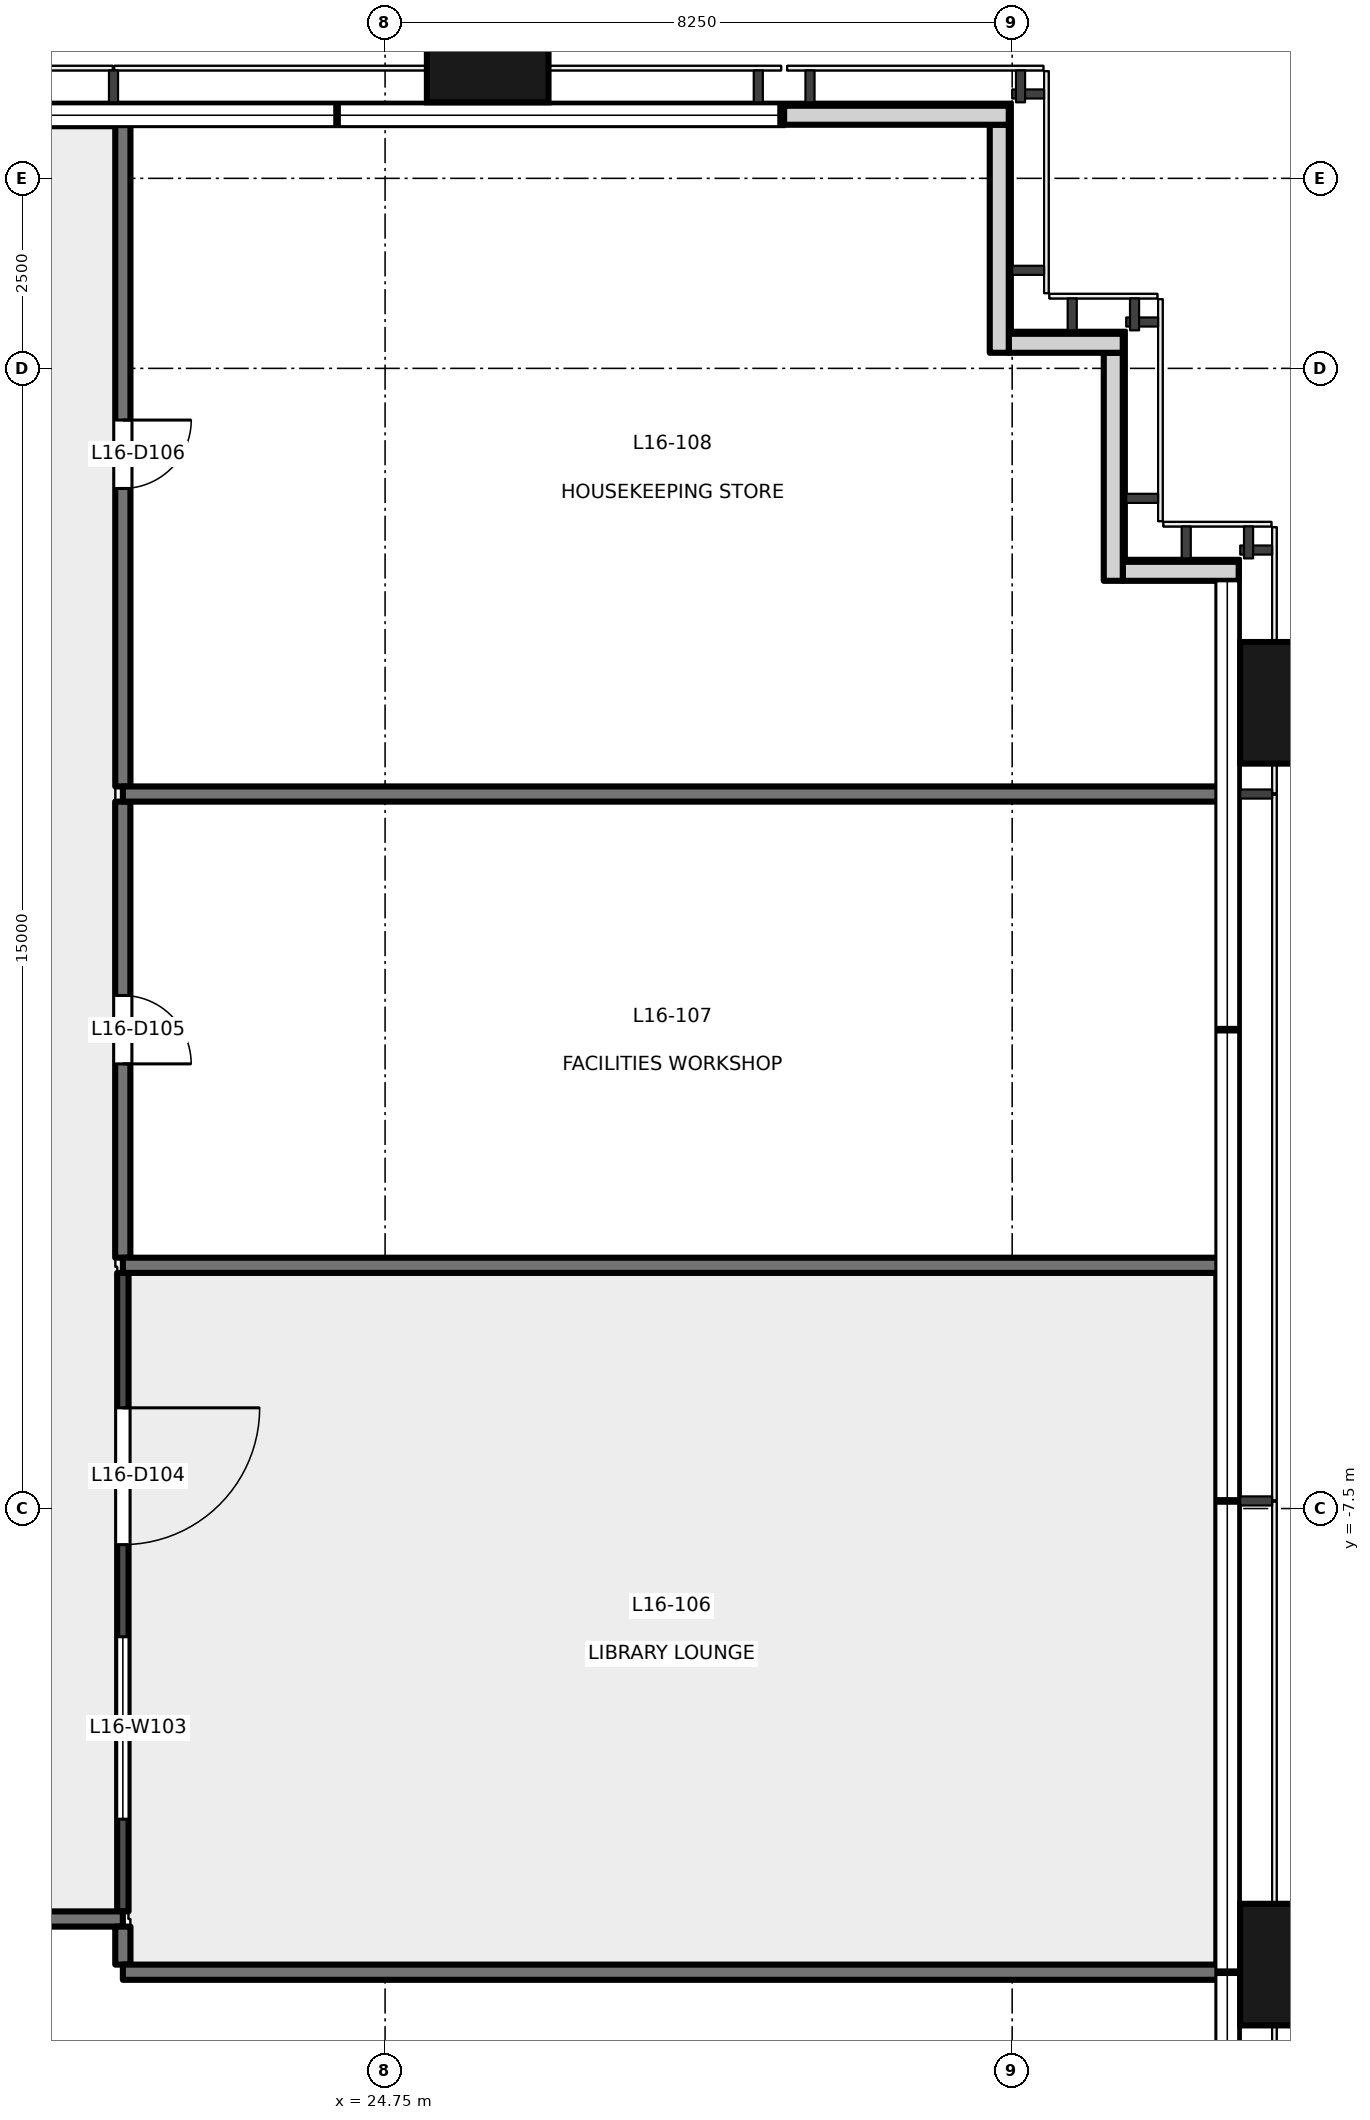
"""IFC4 building model, lengths in metres.
Left out: names, types, materials, properties, quantities, classifications, styles, units other than length and angle.
Written with IfcOpenShell. Run it as: python <this file> out.ifc"""

import sys

from ifc_helpers import new_model, si_unit, direction, frame, frame_2d, origin, origin_2d, place, context, subcontext, project, spatial, rectangle, extrude, element, fill, save


model = new_model("IFC4")
c1 = context("Model", 3, precision=1e-05, world=origin(), true_north=direction((0.0, 1.0)))
c2 = subcontext(c1, "Body", "Model", "MODEL_VIEW")
j1 = project(units=[si_unit("LENGTHUNIT", "METRE"), si_unit("PLANEANGLEUNIT", "RADIAN")], contexts=[c1])
p1 = place(None, origin())
s1 = spatial("IfcSite", under=j1, at=p1, CompositionType="ELEMENT")
p2 = place(p1, origin())
s2 = spatial("IfcBuilding", under=s1, at=p2, CompositionType="ELEMENT")
p3 = place(p2, frame((0.0, 0.0, 74.3)))
s3 = spatial("IfcBuildingStorey", under=s2, at=p3, CompositionType="ELEMENT", Elevation=74.3)
for number, where, z_axis, x_axis in (
    (1, (36.9, -13.5, -0.2), (0.0, 0.0, 1.0), (0.0, 1.0, 0.0)),
    (2, (36.9, 3.1, -0.2), (0.0, 0.0, 1.0), (0.0, 1.0, 0.0)),
    (3, (26.1, 11.9, -0.2), (0.0, 0.0, 1.0), (1.0, 0.0, 0.0)),
):
    element("IfcColumn", number, at=place(p3, frame(where, z_axis=z_axis, x_axis=x_axis)), inside=s3, PredefinedType="COLUMN", context=c2, shape_type="SweptSolid", body=[
        extrude(rectangle(XDim=1.6, YDim=1.8, at=origin_2d()), origin(), (0.0, 0.0, 1.0), 5.4),
    ])
p4 = place(p3, frame((35.98, 4.83, 0.0), z_axis=(0.0, 0.0, 1.0), x_axis=(-1.0, 0.0, 0.0)))
e4 = element("IfcWall", 4, at=p4, inside=s3, PredefinedType="SOLIDWALL", context=c2, shape_type="SweptSolid", body=[
    extrude(rectangle(XDim=1.525, YDim=0.25, at=frame_2d((0.762, 0.0))), origin(), (0.0, 0.0, 1.0), 5.2),
])
p5 = place(p3, frame((34.33, 4.705, 0.0), z_axis=(0.0, 0.0, 1.0), x_axis=(0.0, 1.0, 0.0)))
e5 = element("IfcWall", 5, at=p5, inside=s3, PredefinedType="SOLIDWALL", context=c2, shape_type="SweptSolid", body=[
    extrude(rectangle(XDim=3.0, YDim=0.25, at=frame_2d((1.5, 0.0))), origin(), (0.0, 0.0, 1.0), 5.2),
])
p6 = place(p3, frame((34.455, 7.83, 0.0), z_axis=(0.0, 0.0, 1.0), x_axis=(-1.0, 0.0, 0.0)))
e6 = element("IfcWall", 6, at=p6, inside=s3, PredefinedType="SOLIDWALL", context=c2, shape_type="SweptSolid", body=[
    extrude(rectangle(XDim=1.5, YDim=0.25, at=frame_2d((0.75, 0.0))), origin(), (0.0, 0.0, 1.0), 5.2),
])
p7 = place(p3, frame((32.83, 7.705, 0.0), z_axis=(0.0, 0.0, 1.0), x_axis=(0.0, 1.0, 0.0)))
e7 = element("IfcWall", 7, at=p7, inside=s3, PredefinedType="SOLIDWALL", context=c2, shape_type="SweptSolid", body=[
    extrude(rectangle(XDim=3.0, YDim=0.25, at=frame_2d((1.5, 0.0))), origin(), (0.0, 0.0, 1.0), 5.2),
])
p8 = place(p3, frame((32.955, 10.83, 0.0), z_axis=(0.0, 0.0, 1.0), x_axis=(-1.0, 0.0, 0.0)))
e8 = element("IfcWall", 8, at=p8, inside=s3, PredefinedType="SOLIDWALL", context=c2, shape_type="SweptSolid", body=[
    extrude(rectangle(XDim=2.955, YDim=0.25, at=frame_2d((1.478, 0.0))), origin(), (0.0, 0.0, 1.0), 5.2),
])
p9 = place(p3, frame((21.3, -12.9, 0.0), z_axis=(0.0, 0.0, 1.0), x_axis=(-1.0, 0.0, 0.0)))
e9 = element("IfcWall", 9, at=p9, inside=s3, PredefinedType="PARTITIONING", context=c2, shape_type="SweptSolid", body=[
    extrude(rectangle(XDim=11.788, YDim=0.2, at=frame_2d((5.894, 0.0))), origin(), (0.0, 0.0, 1.0), 3.8),
])
p10 = place(p9, frame((5.444, 0.0, 0.0)))
e10 = element("IfcOpeningElement", 10, at=p10, cuts=e9, PredefinedType="OPENING", context=c2, shape_type="SweptSolid", body=[
    extrude(rectangle(XDim=0.9, YDim=2.1, at=frame_2d((0.45, 1.05))), frame((0.0, 0.111, 0.0), z_axis=(0.0, -1.0, 0.0), x_axis=(1.0, 0.0, 0.0)), (0.0, 0.0, 1.0), 0.221),
])
p11 = place(p3, frame((21.3, -4.4, 0.0), z_axis=(0.0, 0.0, 1.0), x_axis=(0.0, -1.0, 0.0)))
e11 = element("IfcWall", 11, at=p11, inside=s3, PredefinedType="PARTITIONING", context=c2, shape_type="SweptSolid", body=[
    extrude(rectangle(XDim=8.4, YDim=0.15, at=frame_2d((4.2, 0.0))), origin(), (0.0, 0.0, 1.0), 4.3),
])
p12 = place(p11, frame((1.775, 0.0, 0.0)))
e12 = element("IfcOpeningElement", 12, at=p12, cuts=e11, PredefinedType="OPENING", context=c2, shape_type="SweptSolid", body=[
    extrude(rectangle(XDim=1.8, YDim=2.1, at=frame_2d((0.9, 1.05))), frame((0.0, 0.085, 0.0), z_axis=(0.0, -1.0, 0.0), x_axis=(1.0, 0.0, 0.0)), (0.0, 0.0, 1.0), 0.171),
])
p13 = place(p11, frame((4.787, 0.0, 0.0)))
e13 = element("IfcOpeningElement", 13, at=p13, cuts=e11, PredefinedType="OPENING", context=c2, shape_type="SweptSolid", body=[
    extrude(rectangle(XDim=2.4, YDim=2.4, at=frame_2d((1.2, 1.2))), frame((0.0, 0.085, 0.0), z_axis=(0.0, -1.0, 0.0), x_axis=(1.0, 0.0, 0.0)), (0.0, 0.0, 1.0), 0.171),
])
p14 = place(p3, frame((21.299, 1.8, 0.0), z_axis=(0.0, 0.0, 1.0), x_axis=(0.0, -1.0, 0.0)))
e14 = element("IfcWall", 14, at=p14, inside=s3, PredefinedType="PARTITIONING", context=c2, shape_type="SweptSolid", body=[
    extrude(rectangle(XDim=6.0, YDim=0.2, at=frame_2d((3.0, 0.0))), origin(), (0.0, 0.0, 1.0), 4.3),
])
p15 = place(p14, frame((2.55, 0.0, 0.0)))
e15 = element("IfcOpeningElement", 15, at=p15, cuts=e14, PredefinedType="OPENING", context=c2, shape_type="SweptSolid", body=[
    extrude(rectangle(XDim=0.9, YDim=2.1, at=frame_2d((0.45, 1.05))), frame((0.0, 0.111, 0.0), z_axis=(0.0, -1.0, 0.0), x_axis=(1.0, 0.0, 0.0)), (0.0, 0.0, 1.0), 0.221),
])
p16 = place(p3, frame((21.3, 10.74, 0.0), z_axis=(0.0, 0.0, 1.0), x_axis=(0.0, -1.0, 0.0)))
e16 = element("IfcWall", 16, at=p16, inside=s3, PredefinedType="PARTITIONING", context=c2, shape_type="SweptSolid", body=[
    extrude(rectangle(XDim=8.74, YDim=0.2, at=frame_2d((4.37, 0.0))), origin(), (0.0, 0.0, 1.0), 4.3),
])
p17 = place(p16, frame((3.92, 0.0, 0.0)))
e17 = element("IfcOpeningElement", 17, at=p17, cuts=e16, PredefinedType="OPENING", context=c2, shape_type="SweptSolid", body=[
    extrude(rectangle(XDim=0.9, YDim=2.1, at=frame_2d((0.45, 1.05))), frame((0.0, 0.111, 0.0), z_axis=(0.0, -1.0, 0.0), x_axis=(1.0, 0.0, 0.0)), (0.0, 0.0, 1.0), 0.221),
])
p18 = place(p3, frame((21.3, -13.0, 0.0), z_axis=(0.0, 0.0, 1.0), x_axis=(0.0, -1.0, 0.0)))
e18 = element("IfcWall", 18, at=p18, inside=s3, PredefinedType="PARTITIONING", context=c2, shape_type="SweptSolid", body=[
    extrude(rectangle(XDim=0.5, YDim=0.2, at=frame_2d((0.25, 0.0))), origin(), (0.0, 0.0, 1.0), 4.3),
])
for number, where, z_axis, x_axis in (
    (19, (21.3, -13.6, 0.0), (0.0, 0.0, 1.0), (1.0, 0.0, 0.0)),
    (20, (21.3, -4.3, 0.0), (0.0, 0.0, 1.0), (1.0, 0.0, 0.0)),
):
    element("IfcWall", number, at=place(p3, frame(where, z_axis=z_axis, x_axis=x_axis)), inside=s3, PredefinedType="PARTITIONING", context=c2, shape_type="SweptSolid", body=[
        extrude(rectangle(XDim=14.44, YDim=0.2, at=frame_2d((7.22, 0.0))), origin(), (0.0, 0.0, 1.0), 4.3),
    ])
p19 = place(p3, frame((21.3, 1.9, 0.0), z_axis=(0.0, 0.0, 1.0), x_axis=(1.0, 0.0, 0.0)))
e21 = element("IfcWall", 21, at=p19, inside=s3, PredefinedType="PARTITIONING", context=c2, shape_type="SweptSolid", body=[
    extrude(rectangle(XDim=14.44, YDim=0.2, at=frame_2d((7.22, 0.0))), origin(), (0.0, 0.0, 1.0), 5.2),
])
p20 = place(p12, origin())
e22 = element("IfcDoor", 22, at=p20, inside=s3, OperationType="DOUBLE_DOOR_SINGLE_SWING", PredefinedType="DOOR", context=c2, shape_type="SweptSolid", body=[
    extrude(rectangle(XDim=1.8, YDim=2.1, at=frame_2d((0.9, 1.05))), frame((0.0, 0.025, 0.0), z_axis=(0.0, -1.0, 0.0), x_axis=(1.0, 0.0, 0.0)), (0.0, 0.0, 1.0), 0.05),
])
fill(e12, e22)
p21 = place(p15, origin())
e23 = element("IfcDoor", 23, at=p21, inside=s3, OperationType="SINGLE_SWING_RIGHT", PredefinedType="DOOR", context=c2, shape_type="SweptSolid", body=[
    extrude(rectangle(XDim=0.9, YDim=2.1, at=frame_2d((0.45, 1.05))), frame((0.0, 0.025, 0.0), z_axis=(0.0, -1.0, 0.0), x_axis=(1.0, 0.0, 0.0)), (0.0, 0.0, 1.0), 0.05),
])
fill(e15, e23)
p22 = place(p17, origin())
e24 = element("IfcDoor", 24, at=p22, inside=s3, OperationType="SINGLE_SWING_LEFT", PredefinedType="DOOR", context=c2, shape_type="SweptSolid", body=[
    extrude(rectangle(XDim=0.9, YDim=2.1, at=frame_2d((0.45, 1.05))), frame((0.0, 0.025, 0.0), z_axis=(0.0, -1.0, 0.0), x_axis=(1.0, 0.0, 0.0)), (0.0, 0.0, 1.0), 0.05),
])
fill(e17, e24)
p23 = place(p13, origin())
e25 = element("IfcWindow", 25, at=p23, inside=s3, PartitioningType="SINGLE_PANEL", PredefinedType="WINDOW", context=c2, shape_type="SweptSolid", body=[
    extrude(rectangle(XDim=2.4, YDim=2.4, at=frame_2d((1.2, 1.2))), frame((0.0, 0.03, 0.0), z_axis=(0.0, -1.0, 0.0), x_axis=(1.0, 0.0, 0.0)), (0.0, 0.0, 1.0), 0.06),
])
fill(e13, e25)
save(model, sys.argv[1])
